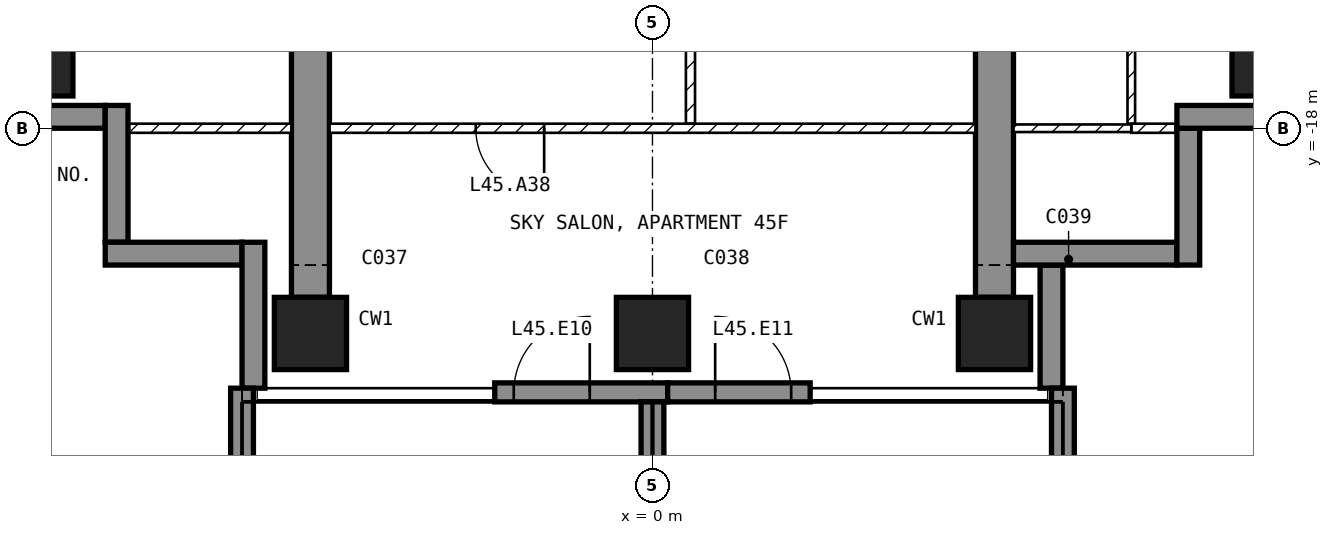
"""IFC4 building model, lengths in metres.
Left out: names, types, materials, properties, quantities, classifications, styles, units other than length and angle.
Written with IfcOpenShell. Run it as: python <this file> out.ifc"""

import sys

from ifc_helpers import new_model, si_unit, direction, frame, frame_2d, origin, origin_2d, place, context, subcontext, project, spatial, polyline, rectangle, outline, extrude, element, fill, save


model = new_model("IFC4")
c1 = context("Model", 3, precision=1e-05, world=origin(), true_north=direction((0.0, 1.0)))
c2 = subcontext(c1, "Body", "Model", "MODEL_VIEW")
j1 = project(units=[si_unit("LENGTHUNIT", "METRE"), si_unit("PLANEANGLEUNIT", "RADIAN")], contexts=[c1])
p1 = place(None, origin())
s1 = spatial("IfcSite", under=j1, at=p1, CompositionType="ELEMENT")
p2 = place(p1, origin())
s2 = spatial("IfcBuilding", under=s1, at=p2, CompositionType="ELEMENT")
p3 = place(p2, frame((0.0, 0.0, 184.1)))
s3 = spatial("IfcBuildingStorey", under=s2, at=p3, CompositionType="ELEMENT", Elevation=184.1)
for number, where, z_axis, x_axis in (
    (1, (-8.1, -17.1, -0.25), (0.0, 0.0, 1.0), (1.0, 0.0, 0.0)),
    (2, (-4.5, -20.7, -0.25), (0.0, 0.0, 1.0), (1.0, 0.0, 0.0)),
    (3, (0.0, -20.7, -0.25), (0.0, 0.0, 1.0), (1.0, 0.0, 0.0)),
    (4, (4.5, -20.7, -0.25), (0.0, 0.0, 1.0), (1.0, 0.0, 0.0)),
    (5, (8.1, -17.1, -0.25), (0.0, 0.0, 1.0), (1.0, 0.0, 0.0)),
):
    element("IfcColumn", number, at=place(p3, frame(where, z_axis=z_axis, x_axis=x_axis)), inside=s3, PredefinedType="COLUMN", context=c2, shape_type="SweptSolid", body=[
        extrude(rectangle(XDim=0.95, YDim=0.95, at=origin_2d()), origin(), (0.0, 0.0, 1.0), 3.5),
    ])
for number, where, z_axis, x_axis in (
    (6, (-4.75, -20.225, -0.25), (1.0, 0.0, 0.0), (0.0, 1.0, 0.0)),
    (7, (4.25, -20.225, -0.25), (1.0, 0.0, 0.0), (0.0, 1.0, 0.0)),
):
    element("IfcWall", number, at=place(p3, frame(where, z_axis=z_axis, x_axis=x_axis)), inside=s3, PredefinedType="SHEAR", context=c2, shape_type="SweptSolid", body=[
        extrude(outline(polyline([(0.0, 0.0), (6.725, 0.0), (6.725, 2.65), (9.125, 2.65), (9.125, 0.0), (11.225, 0.0), (11.225, 3.5), (0.0, 3.5), (0.0, 0.0)])), origin(), (0.0, 0.0, 1.0), 0.5),
    ])
p4 = place(p3, frame((-2.075, -21.475, 0.0), z_axis=(0.0, 0.0, 1.0), x_axis=(1.0, 0.0, 0.0)))
e8 = element("IfcWall", 8, at=p4, inside=s3, PredefinedType="SOLIDWALL", context=c2, shape_type="SweptSolid", body=[
    extrude(rectangle(XDim=2.275, YDim=0.25, at=frame_2d((1.137, 0.0))), origin(), (0.0, 0.0, 1.0), 3.25),
])
p5 = place(p4, frame((0.25, 0.0, 0.0)))
e9 = element("IfcOpeningElement", 9, at=p5, cuts=e8, PredefinedType="OPENING", context=c2, shape_type="SweptSolid", body=[
    extrude(rectangle(XDim=1.0, YDim=2.4, at=frame_2d((0.5, 1.2))), frame((0.0, 0.135, 0.0), z_axis=(0.0, -1.0, 0.0), x_axis=(1.0, 0.0, 0.0)), (0.0, 0.0, 1.0), 0.27),
])
p6 = place(p3, frame((0.2, -21.475, 0.0), z_axis=(0.0, 0.0, 1.0), x_axis=(1.0, 0.0, 0.0)))
e10 = element("IfcWall", 10, at=p6, inside=s3, PredefinedType="SOLIDWALL", context=c2, shape_type="SweptSolid", body=[
    extrude(rectangle(XDim=1.875, YDim=0.25, at=frame_2d((0.938, 0.0))), origin(), (0.0, 0.0, 1.0), 3.25),
])
p7 = place(p6, frame((0.625, 0.0, 0.0)))
e11 = element("IfcOpeningElement", 11, at=p7, cuts=e10, PredefinedType="OPENING", context=c2, shape_type="SweptSolid", body=[
    extrude(rectangle(XDim=1.0, YDim=2.4, at=frame_2d((0.5, 1.2))), frame((0.0, 0.135, 0.0), z_axis=(0.0, -1.0, 0.0), x_axis=(1.0, 0.0, 0.0)), (0.0, 0.0, 1.0), 0.27),
])
p8 = place(p3, frame((5.25, -21.42, 0.0), z_axis=(0.0, 0.0, 1.0), x_axis=(0.0, 1.0, 0.0)))
e12 = element("IfcWall", 12, at=p8, inside=s3, PredefinedType="SOLIDWALL", context=c2, shape_type="SweptSolid", body=[
    extrude(rectangle(XDim=1.62, YDim=0.3, at=frame_2d((0.81, 0.0))), origin(), (0.0, 0.0, 1.0), 3.25),
])
p9 = place(p3, frame((4.75, -19.65, 0.0), z_axis=(0.0, 0.0, 1.0), x_axis=(1.0, 0.0, 0.0)))
e13 = element("IfcWall", 13, at=p9, inside=s3, PredefinedType="SOLIDWALL", context=c2, shape_type="SweptSolid", body=[
    extrude(rectangle(XDim=2.15, YDim=0.3, at=frame_2d((1.075, 0.0))), origin(), (0.0, 0.0, 1.0), 3.25),
])
p10 = place(p3, frame((7.05, -19.8, 0.0), z_axis=(0.0, 0.0, 1.0), x_axis=(0.0, 1.0, 0.0)))
e14 = element("IfcWall", 14, at=p10, inside=s3, PredefinedType="SOLIDWALL", context=c2, shape_type="SweptSolid", body=[
    extrude(rectangle(XDim=1.8, YDim=0.3, at=frame_2d((0.9, 0.0))), origin(), (0.0, 0.0, 1.0), 3.25),
])
p11 = place(p3, frame((6.9, -17.85, 0.0), z_axis=(0.0, 0.0, 1.0), x_axis=(1.0, 0.0, 0.0)))
e15 = element("IfcWall", 15, at=p11, inside=s3, PredefinedType="SOLIDWALL", context=c2, shape_type="SweptSolid", body=[
    extrude(rectangle(XDim=1.85, YDim=0.3, at=frame_2d((0.925, 0.0))), origin(), (0.0, 0.0, 1.0), 3.25),
])
p12 = place(p3, frame((-8.75, -17.85, 0.0), z_axis=(0.0, 0.0, 1.0), x_axis=(1.0, 0.0, 0.0)))
e16 = element("IfcWall", 16, at=p12, inside=s3, PredefinedType="SOLIDWALL", context=c2, shape_type="SweptSolid", body=[
    extrude(rectangle(XDim=1.55, YDim=0.3, at=frame_2d((0.775, 0.0))), origin(), (0.0, 0.0, 1.0), 3.25),
])
for number, where, z_axis, x_axis in (
    (17, (-7.05, -17.7, 0.0), (0.0, 0.0, 1.0), (0.0, -1.0, 0.0)),
    (18, (-7.2, -19.65, 0.0), (0.0, 0.0, 1.0), (1.0, 0.0, 0.0)),
):
    element("IfcWall", number, at=place(p3, frame(where, z_axis=z_axis, x_axis=x_axis)), inside=s3, PredefinedType="SOLIDWALL", context=c2, shape_type="SweptSolid", body=[
        extrude(rectangle(XDim=1.8, YDim=0.3, at=frame_2d((0.9, 0.0))), origin(), (0.0, 0.0, 1.0), 3.25),
    ])
p13 = place(p3, frame((-5.25, -19.5, 0.0), z_axis=(0.0, 0.0, 1.0), x_axis=(0.0, -1.0, 0.0)))
e19 = element("IfcWall", 19, at=p13, inside=s3, PredefinedType="SOLIDWALL", context=c2, shape_type="SweptSolid", body=[
    extrude(rectangle(XDim=1.92, YDim=0.3, at=frame_2d((0.96, 0.0))), origin(), (0.0, 0.0, 1.0), 3.25),
])
p14 = place(p3, frame((-5.4, -21.42, 0.0), z_axis=(0.0, 0.0, 1.0), x_axis=(0.0, -1.0, 0.0)))
e20 = element("IfcWall", 20, at=p14, inside=s3, PredefinedType="SOLIDWALL", context=c2, shape_type="SweptSolid", body=[
    extrude(rectangle(XDim=2.88, YDim=0.3, at=frame_2d((1.44, 0.0))), origin(), (0.0, 0.0, 1.0), 3.25),
])
p15 = place(p3, frame((0.0, -21.6, 0.0), z_axis=(0.0, 0.0, 1.0), x_axis=(0.0, -1.0, 0.0)))
e21 = element("IfcWall", 21, at=p15, inside=s3, PredefinedType="SOLIDWALL", context=c2, shape_type="SweptSolid", body=[
    extrude(rectangle(XDim=2.7, YDim=0.3, at=frame_2d((1.35, 0.0))), origin(), (0.0, 0.0, 1.0), 3.25),
])
p16 = place(p3, frame((5.4, -21.42, 0.0), z_axis=(0.0, 0.0, 1.0), x_axis=(0.0, -1.0, 0.0)))
e22 = element("IfcWall", 22, at=p16, inside=s3, PredefinedType="SOLIDWALL", context=c2, shape_type="SweptSolid", body=[
    extrude(rectangle(XDim=2.88, YDim=0.3, at=frame_2d((1.44, 0.0))), origin(), (0.0, 0.0, 1.0), 3.25),
])
p17 = place(p3, frame((0.5, -15.06, 0.0), z_axis=(0.0, 0.0, 1.0), x_axis=(0.0, -1.0, 0.0)))
e23 = element("IfcWall", 23, at=p17, inside=s3, PredefinedType="PARTITIONING", context=c2, shape_type="SweptSolid", body=[
    extrude(rectangle(XDim=2.88, YDim=0.12, at=frame_2d((1.44, 0.0))), origin(), (0.0, 0.0, 1.0), 3.25),
])
p18 = place(p3, frame((4.25, -18.0, 0.0), z_axis=(0.0, 0.0, 1.0), x_axis=(-1.0, 0.0, 0.0)))
e24 = element("IfcWall", 24, at=p18, inside=s3, PredefinedType="PARTITIONING", context=c2, shape_type="SweptSolid", body=[
    extrude(rectangle(XDim=8.5, YDim=0.12, at=frame_2d((4.25, 0.0))), origin(), (0.0, 0.0, 1.0), 3.25),
])
p19 = place(p18, frame((5.675, 0.0, 0.0)))
e25 = element("IfcOpeningElement", 25, at=p19, cuts=e24, PredefinedType="OPENING", context=c2, shape_type="SweptSolid", body=[
    extrude(rectangle(XDim=0.9, YDim=2.1, at=frame_2d((0.45, 1.05))), frame((0.0, 0.07, 0.0), z_axis=(0.0, -1.0, 0.0), x_axis=(1.0, 0.0, 0.0)), (0.0, 0.0, 1.0), 0.14),
])
p20 = place(p3, frame((6.3, -17.94, 0.0), z_axis=(0.0, 0.0, 1.0), x_axis=(0.0, 1.0, 0.0)))
e26 = element("IfcWall", 26, at=p20, inside=s3, PredefinedType="PARTITIONING", context=c2, shape_type="SweptSolid", body=[
    extrude(rectangle(XDim=3.49, YDim=0.1, at=frame_2d((1.745, 0.0))), origin(), (0.0, 0.0, 1.0), 3.25),
])
p21 = place(p20, frame((1.32, 0.0, 0.0)))
e27 = element("IfcOpeningElement", 27, at=p21, cuts=e26, PredefinedType="OPENING", context=c2, shape_type="SweptSolid", body=[
    extrude(rectangle(XDim=0.85, YDim=2.1, at=frame_2d((0.425, 1.05))), frame((0.0, 0.06, 0.0), z_axis=(0.0, -1.0, 0.0), x_axis=(1.0, 0.0, 0.0)), (0.0, 0.0, 1.0), 0.12),
])
p22 = place(p3, frame((7.12, -18.0, 0.0), z_axis=(0.0, 0.0, 1.0), x_axis=(-1.0, 0.0, 0.0)))
e28 = element("IfcWall", 28, at=p22, inside=s3, PredefinedType="PARTITIONING", context=c2, shape_type="SweptSolid", body=[
    extrude(rectangle(XDim=0.82, YDim=0.12, at=frame_2d((0.41, 0.0))), origin(), (0.0, 0.0, 1.0), 3.25),
])
p23 = place(p3, frame((6.3, -18.0, 0.0), z_axis=(0.0, 0.0, 1.0), x_axis=(-1.0, 0.0, 0.0)))
e29 = element("IfcWall", 29, at=p23, inside=s3, PredefinedType="PARTITIONING", context=c2, shape_type="SweptSolid", body=[
    extrude(rectangle(XDim=1.55, YDim=0.1, at=frame_2d((0.775, 0.0))), origin(), (0.0, 0.0, 1.0), 3.25),
])
p24 = place(p3, frame((-4.75, -18.0, 0.0), z_axis=(0.0, 0.0, 1.0), x_axis=(-1.0, 0.0, 0.0)))
e30 = element("IfcWall", 30, at=p24, inside=s3, PredefinedType="PARTITIONING", context=c2, shape_type="SweptSolid", body=[
    extrude(rectangle(XDim=2.37, YDim=0.12, at=frame_2d((1.185, 0.0))), origin(), (0.0, 0.0, 1.0), 3.25),
])
p25 = place(p5, origin())
e31 = element("IfcDoor", 31, at=p25, inside=s3, OperationType="SINGLE_SWING_RIGHT", PredefinedType="DOOR", context=c2, shape_type="SweptSolid", body=[
    extrude(rectangle(XDim=1.0, YDim=2.4, at=frame_2d((0.5, 1.2))), frame((0.0, 0.025, 0.0), z_axis=(0.0, -1.0, 0.0), x_axis=(1.0, 0.0, 0.0)), (0.0, 0.0, 1.0), 0.05),
])
fill(e9, e31)
p26 = place(p7, origin())
e32 = element("IfcDoor", 32, at=p26, inside=s3, OperationType="SINGLE_SWING_LEFT", PredefinedType="DOOR", context=c2, shape_type="SweptSolid", body=[
    extrude(rectangle(XDim=1.0, YDim=2.4, at=frame_2d((0.5, 1.2))), frame((0.0, 0.025, 0.0), z_axis=(0.0, -1.0, 0.0), x_axis=(1.0, 0.0, 0.0)), (0.0, 0.0, 1.0), 0.05),
])
fill(e11, e32)
p27 = place(p19, origin())
e33 = element("IfcDoor", 33, at=p27, inside=s3, OperationType="SINGLE_SWING_LEFT", PredefinedType="DOOR", context=c2, shape_type="SweptSolid", body=[
    extrude(rectangle(XDim=0.9, YDim=2.1, at=frame_2d((0.45, 1.05))), frame((0.0, 0.025, 0.0), z_axis=(0.0, -1.0, 0.0), x_axis=(1.0, 0.0, 0.0)), (0.0, 0.0, 1.0), 0.05),
])
fill(e25, e33)
save(model, sys.argv[1])
